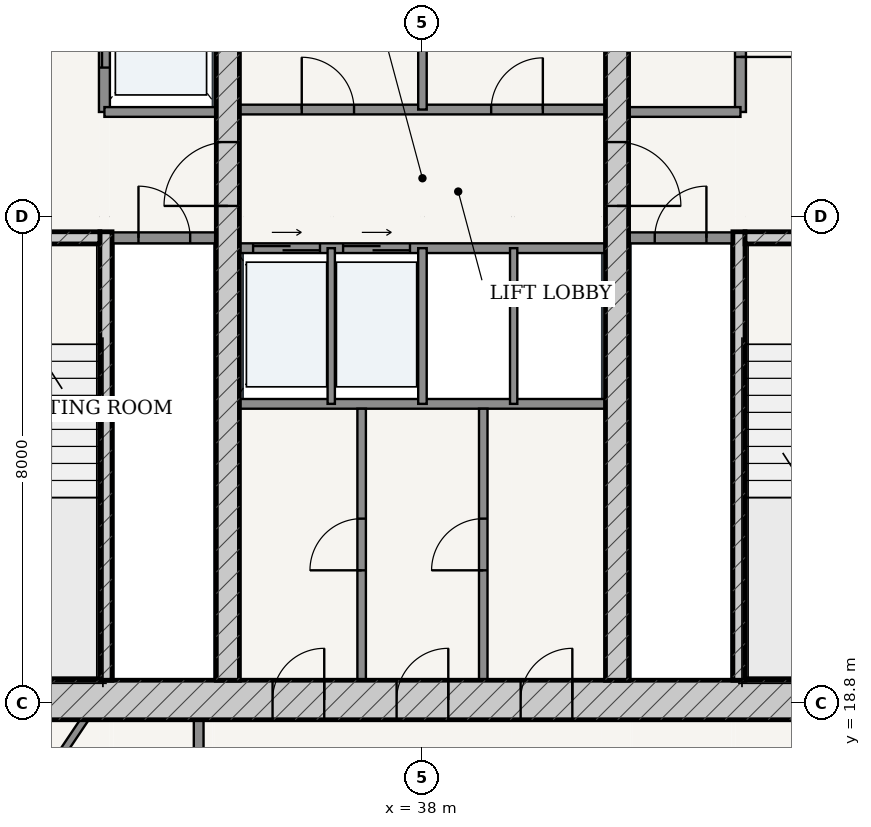
"""IFC4 building model, lengths in metres.
Left out: names, types, materials, properties, quantities, classifications, styles, units other than length and angle.
Written with IfcOpenShell. Run it as: python <this file> out.ifc"""

import sys

from ifc_helpers import new_model, si_unit, direction, frame, frame_2d, origin, place, context, subcontext, project, spatial, rectangle, extrude, source, transform, mapped, element, fill, save


model = new_model("IFC4")
c1 = context("Model", 3, precision=1e-05, world=origin(), true_north=direction((-0.2419218956, 0.970295726276)))
c2 = subcontext(c1, "Body", "Model", "MODEL_VIEW")
j1 = project(units=[si_unit("LENGTHUNIT", "METRE"), si_unit("PLANEANGLEUNIT", "RADIAN")], contexts=[c1])
p1 = place(None, origin())
s1 = spatial("IfcSite", under=j1, at=p1, CompositionType="ELEMENT")
p2 = place(p1, origin())
s2 = spatial("IfcBuilding", under=s1, at=p2, CompositionType="ELEMENT")
p3 = place(p2, frame((0.0, 0.0, 175.0)))
s3 = spatial("IfcBuildingStorey", under=s2, at=p3, CompositionType="ELEMENT", Elevation=175.0)
p4 = place(p3, frame((28.725, 18.85, 0.0), z_axis=(0.0, 0.0, 1.0), x_axis=(1.0, 0.0, 0.0)))
e1 = element("IfcWall", 1, at=p4, inside=s3, PredefinedType="SHEAR", context=c2, shape_type="SweptSolid", body=[
    extrude(rectangle(XDim=18.55, YDim=0.65, at=frame_2d((9.275, 0.0))), origin(), (0.0, 0.0, 1.0), 3.33),
])
p5 = place(p4, frame((6.81, 0.0, 0.0)))
e2 = element("IfcOpeningElement", 2, at=p5, cuts=e1, PredefinedType="OPENING", context=c2, shape_type="SweptSolid", body=[
    extrude(rectangle(XDim=0.85, YDim=2.1, at=frame_2d((0.425, 1.05))), frame((0.0, 0.335, 0.0), z_axis=(0.0, -1.0, 0.0), x_axis=(1.0, 0.0, 0.0)), (0.0, 0.0, 1.0), 0.67),
])
p6 = place(p4, frame((8.85, 0.0, 0.0)))
e3 = element("IfcOpeningElement", 3, at=p6, cuts=e1, PredefinedType="OPENING", context=c2, shape_type="SweptSolid", body=[
    extrude(rectangle(XDim=0.85, YDim=2.1, at=frame_2d((0.425, 1.05))), frame((0.0, 0.335, 0.0), z_axis=(0.0, -1.0, 0.0), x_axis=(1.0, 0.0, 0.0)), (0.0, 0.0, 1.0), 0.67),
])
p7 = place(p4, frame((10.89, 0.0, 0.0)))
e4 = element("IfcOpeningElement", 4, at=p7, cuts=e1, PredefinedType="OPENING", context=c2, shape_type="SweptSolid", body=[
    extrude(rectangle(XDim=0.85, YDim=2.1, at=frame_2d((0.425, 1.05))), frame((0.0, 0.335, 0.0), z_axis=(0.0, -1.0, 0.0), x_axis=(1.0, 0.0, 0.0)), (0.0, 0.0, 1.0), 0.67),
])
p8 = place(p3, frame((32.795, 19.175, 0.0), z_axis=(0.0, 0.0, 1.0), x_axis=(0.0, 1.0, 0.0)))
e5 = element("IfcWall", 5, at=p8, inside=s3, PredefinedType="SOLIDWALL", context=c2, shape_type="SweptSolid", body=[
    extrude(rectangle(XDim=7.375, YDim=0.2, at=frame_2d((3.688, 0.0))), origin(), (0.0, 0.0, 1.0), 3.33),
])
p9 = place(p3, frame((29.375, 26.45, 0.0), z_axis=(0.0, 0.0, 1.0), x_axis=(1.0, 0.0, 0.0)))
e6 = element("IfcWall", 6, at=p9, inside=s3, PredefinedType="SOLIDWALL", context=c2, shape_type="SweptSolid", body=[
    extrude(rectangle(XDim=3.32, YDim=0.2, at=frame_2d((1.66, 0.0))), origin(), (0.0, 0.0, 1.0), 3.33),
])
p10 = place(p9, frame((1.185, 0.0, 0.0)))
e7 = element("IfcOpeningElement", 7, at=p10, cuts=e6, PredefinedType="OPENING", context=c2, shape_type="SweptSolid", body=[
    extrude(rectangle(XDim=0.95, YDim=2.15, at=frame_2d((0.475, 1.075))), frame((0.0, 0.11, 0.0), z_axis=(0.0, -1.0, 0.0), x_axis=(1.0, 0.0, 0.0)), (0.0, 0.0, 1.0), 0.22),
])
p11 = place(p3, frame((43.205, 19.175, 0.0), z_axis=(0.0, 0.0, 1.0), x_axis=(0.0, 1.0, 0.0)))
e8 = element("IfcWall", 8, at=p11, inside=s3, PredefinedType="SOLIDWALL", context=c2, shape_type="SweptSolid", body=[
    extrude(rectangle(XDim=7.375, YDim=0.2, at=frame_2d((3.688, 0.0))), origin(), (0.0, 0.0, 1.0), 3.33),
])
p12 = place(p3, frame((43.305, 26.45, 0.0), z_axis=(0.0, 0.0, 1.0), x_axis=(1.0, 0.0, 0.0)))
e9 = element("IfcWall", 9, at=p12, inside=s3, PredefinedType="SOLIDWALL", context=c2, shape_type="SweptSolid", body=[
    extrude(rectangle(XDim=3.32, YDim=0.2, at=frame_2d((1.66, 0.0))), origin(), (0.0, 0.0, 1.0), 3.33),
])
p13 = place(p12, frame((1.185, 0.0, 0.0)))
e10 = element("IfcOpeningElement", 10, at=p13, cuts=e9, PredefinedType="OPENING", context=c2, shape_type="SweptSolid", body=[
    extrude(rectangle(XDim=0.95, YDim=2.15, at=frame_2d((0.475, 1.075))), frame((0.0, 0.11, 0.0), z_axis=(0.0, -1.0, 0.0), x_axis=(1.0, 0.0, 0.0)), (0.0, 0.0, 1.0), 0.22),
])
p14 = place(p3, frame((34.8, 19.175, 0.0), z_axis=(0.0, 0.0, 1.0), x_axis=(0.0, 1.0, 0.0)))
e11 = element("IfcWall", 11, at=p14, inside=s3, PredefinedType="SHEAR", context=c2, shape_type="SweptSolid", body=[
    extrude(rectangle(XDim=15.25, YDim=0.38, at=frame_2d((7.625, 0.0))), origin(), (0.0, 0.0, 1.0), 3.33),
])
p15 = place(p14, frame((7.8, 0.0, 0.0)))
e12 = element("IfcOpeningElement", 12, at=p15, cuts=e11, PredefinedType="OPENING", context=c2, shape_type="SweptSolid", body=[
    extrude(rectangle(XDim=1.05, YDim=2.15, at=frame_2d((0.525, 1.075))), frame((0.0, 0.2, 0.0), z_axis=(0.0, -1.0, 0.0), x_axis=(1.0, 0.0, 0.0)), (0.0, 0.0, 1.0), 0.4),
])
p16 = place(p3, frame((41.2, 19.175, 0.0), z_axis=(0.0, 0.0, 1.0), x_axis=(0.0, 1.0, 0.0)))
e13 = element("IfcWall", 13, at=p16, inside=s3, PredefinedType="SHEAR", context=c2, shape_type="SweptSolid", body=[
    extrude(rectangle(XDim=15.25, YDim=0.38, at=frame_2d((7.625, 0.0))), origin(), (0.0, 0.0, 1.0), 3.33),
])
p17 = place(p16, frame((7.8, 0.0, 0.0)))
e14 = element("IfcOpeningElement", 14, at=p17, cuts=e13, PredefinedType="OPENING", context=c2, shape_type="SweptSolid", body=[
    extrude(rectangle(XDim=1.05, YDim=2.15, at=frame_2d((0.525, 1.075))), frame((0.0, 0.2, 0.0), z_axis=(0.0, -1.0, 0.0), x_axis=(1.0, 0.0, 0.0)), (0.0, 0.0, 1.0), 0.4),
])
p18 = place(p3, frame((32.9, 26.45, 0.0), z_axis=(0.0, 0.0, 1.0), x_axis=(1.0, 0.0, 0.0)))
e15 = element("IfcWall", 15, at=p18, inside=s3, PredefinedType="PARTITIONING", context=c2, shape_type="SweptSolid", body=[
    extrude(rectangle(XDim=1.71, YDim=0.18, at=frame_2d((0.855, 0.0))), origin(), (0.0, 0.0, 1.0), 3.33),
])
p19 = place(p18, frame((0.43, 0.0, 0.0)))
e16 = element("IfcOpeningElement", 16, at=p19, cuts=e15, PredefinedType="OPENING", context=c2, shape_type="SweptSolid", body=[
    extrude(rectangle(XDim=0.85, YDim=2.1, at=frame_2d((0.425, 1.05))), frame((0.0, 0.1, 0.0), z_axis=(0.0, -1.0, 0.0), x_axis=(1.0, 0.0, 0.0)), (0.0, 0.0, 1.0), 0.2),
])
p20 = place(p3, frame((41.39, 26.45, 0.0), z_axis=(0.0, 0.0, 1.0), x_axis=(1.0, 0.0, 0.0)))
e17 = element("IfcWall", 17, at=p20, inside=s3, PredefinedType="PARTITIONING", context=c2, shape_type="SweptSolid", body=[
    extrude(rectangle(XDim=1.71, YDim=0.18, at=frame_2d((0.855, 0.0))), origin(), (0.0, 0.0, 1.0), 3.33),
])
p21 = place(p20, frame((0.43, 0.0, 0.0)))
e18 = element("IfcOpeningElement", 18, at=p21, cuts=e17, PredefinedType="OPENING", context=c2, shape_type="SweptSolid", body=[
    extrude(rectangle(XDim=0.85, YDim=2.1, at=frame_2d((0.425, 1.05))), frame((0.0, 0.1, 0.0), z_axis=(0.0, -1.0, 0.0), x_axis=(1.0, 0.0, 0.0)), (0.0, 0.0, 1.0), 0.2),
])
p22 = place(p3, frame((32.77, 28.52, 0.0), z_axis=(0.0, 0.0, 1.0), x_axis=(0.0, 1.0, 0.0)))
e19 = element("IfcWall", 19, at=p22, inside=s3, PredefinedType="PARTITIONING", context=c2, shape_type="SweptSolid", body=[
    extrude(rectangle(XDim=5.905, YDim=0.18, at=frame_2d((2.953, 0.0))), origin(), (0.0, 0.0, 1.0), 3.33),
])
p23 = place(p22, frame((3.655, 0.0, 0.0)))
e20 = element("IfcOpeningElement", 20, at=p23, cuts=e19, PredefinedType="OPENING", context=c2, shape_type="SweptSolid", body=[
    extrude(rectangle(XDim=1.15, YDim=2.2, at=frame_2d((0.575, 1.1))), frame((0.0, 0.1, 0.0), z_axis=(0.0, -1.0, 0.0), x_axis=(1.0, 0.0, 0.0)), (0.0, 0.0, 1.0), 0.2),
])
p24 = place(p22, frame((0.73, 0.0, 0.0)))
e21 = element("IfcOpeningElement", 21, at=p24, cuts=e19, PredefinedType="OPENING", context=c2, shape_type="SweptSolid", body=[
    extrude(rectangle(XDim=1.2, YDim=2.25, at=frame_2d((0.6, 1.125))), frame((0.0, 0.1, 0.0), z_axis=(0.0, -1.0, 0.0), x_axis=(1.0, 0.0, 0.0)), (0.0, 0.0, 1.0), 0.2),
])
p25 = place(p3, frame((32.77, 28.52, 0.0), z_axis=(0.0, 0.0, 1.0), x_axis=(1.0, 0.0, 0.0)))
e22 = element("IfcWall", 22, at=p25, inside=s3, PredefinedType="PARTITIONING", context=c2, shape_type="SweptSolid", body=[
    extrude(rectangle(XDim=1.84, YDim=0.16, at=frame_2d((0.92, 0.0))), origin(), (0.0, 0.0, 1.0), 3.33),
])
p26 = place(p3, frame((43.23, 28.52, 0.0), z_axis=(0.0, 0.0, 1.0), x_axis=(0.0, 1.0, 0.0)))
e23 = element("IfcWall", 23, at=p26, inside=s3, PredefinedType="PARTITIONING", context=c2, shape_type="SweptSolid", body=[
    extrude(rectangle(XDim=5.905, YDim=0.18, at=frame_2d((2.953, 0.0))), origin(), (0.0, 0.0, 1.0), 3.33),
])
p27 = place(p26, frame((0.905, 0.0, 0.0)))
e24 = element("IfcOpeningElement", 24, at=p27, cuts=e23, PredefinedType="OPENING", context=c2, shape_type="SweptSolid", body=[
    extrude(rectangle(XDim=0.85, YDim=2.1, at=frame_2d((0.425, 1.05))), frame((0.0, 0.1, 0.0), z_axis=(0.0, -1.0, 0.0), x_axis=(1.0, 0.0, 0.0)), (0.0, 0.0, 1.0), 0.2),
])
p28 = place(p26, frame((3.655, 0.0, 0.0)))
e25 = element("IfcOpeningElement", 25, at=p28, cuts=e23, PredefinedType="OPENING", context=c2, shape_type="SweptSolid", body=[
    extrude(rectangle(XDim=1.15, YDim=2.2, at=frame_2d((0.575, 1.1))), frame((0.0, 0.1, 0.0), z_axis=(0.0, -1.0, 0.0), x_axis=(1.0, 0.0, 0.0)), (0.0, 0.0, 1.0), 0.2),
])
p29 = place(p3, frame((41.39, 28.52, 0.0), z_axis=(0.0, 0.0, 1.0), x_axis=(1.0, 0.0, 0.0)))
e26 = element("IfcWall", 26, at=p29, inside=s3, PredefinedType="PARTITIONING", context=c2, shape_type="SweptSolid", body=[
    extrude(rectangle(XDim=1.84, YDim=0.16, at=frame_2d((0.92, 0.0))), origin(), (0.0, 0.0, 1.0), 3.33),
])
p30 = place(p3, frame((34.99, 28.56, 0.0), z_axis=(0.0, 0.0, 1.0), x_axis=(1.0, 0.0, 0.0)))
e27 = element("IfcWall", 27, at=p30, inside=s3, PredefinedType="PARTITIONING", context=c2, shape_type="SweptSolid", body=[
    extrude(rectangle(XDim=6.02, YDim=0.16, at=frame_2d((3.01, 0.0))), origin(), (0.0, 0.0, 1.0), 3.33),
])
p31 = place(p30, frame((1.025, 0.0, 0.0)))
e28 = element("IfcOpeningElement", 28, at=p31, cuts=e27, PredefinedType="OPENING", context=c2, shape_type="SweptSolid", body=[
    extrude(rectangle(XDim=0.86, YDim=2.1, at=frame_2d((0.43, 1.05))), frame((0.0, 0.09, 0.0), z_axis=(0.0, -1.0, 0.0), x_axis=(1.0, 0.0, 0.0)), (0.0, 0.0, 1.0), 0.18),
])
p32 = place(p30, frame((4.14, 0.0, 0.0)))
e29 = element("IfcOpeningElement", 29, at=p32, cuts=e27, PredefinedType="OPENING", context=c2, shape_type="SweptSolid", body=[
    extrude(rectangle(XDim=0.85, YDim=2.1, at=frame_2d((0.425, 1.05))), frame((0.0, 0.09, 0.0), z_axis=(0.0, -1.0, 0.0), x_axis=(1.0, 0.0, 0.0)), (0.0, 0.0, 1.0), 0.18),
])
p33 = place(p3, frame((38.0, 28.56, 0.0), z_axis=(0.0, 0.0, 1.0), x_axis=(0.0, 1.0, 0.0)))
e30 = element("IfcWall", 30, at=p33, inside=s3, PredefinedType="PARTITIONING", context=c2, shape_type="SweptSolid", body=[
    extrude(rectangle(XDim=5.865, YDim=0.14, at=frame_2d((2.933, 0.0))), origin(), (0.0, 0.0, 1.0), 3.33),
])
p34 = place(p3, frame((34.99, 26.28, 0.0), z_axis=(0.0, 0.0, 1.0), x_axis=(1.0, 0.0, 0.0)))
e31 = element("IfcWall", 31, at=p34, inside=s3, PredefinedType="PARTITIONING", context=c2, shape_type="SweptSolid", body=[
    extrude(rectangle(XDim=6.02, YDim=0.16, at=frame_2d((3.01, 0.0))), origin(), (0.0, 0.0, 1.0), 3.33),
])
p35 = place(p34, frame((0.225, 0.0, 0.0)))
e32 = element("IfcOpeningElement", 32, at=p35, cuts=e31, PredefinedType="OPENING", context=c2, shape_type="SweptSolid", body=[
    extrude(rectangle(XDim=1.1, YDim=2.2, at=frame_2d((0.55, 1.1))), frame((0.0, 0.09, 0.0), z_axis=(0.0, -1.0, 0.0), x_axis=(1.0, 0.0, 0.0)), (0.0, 0.0, 1.0), 0.18),
])
p36 = place(p34, frame((1.705, 0.0, 0.0)))
e33 = element("IfcOpeningElement", 33, at=p36, cuts=e31, PredefinedType="OPENING", context=c2, shape_type="SweptSolid", body=[
    extrude(rectangle(XDim=1.1, YDim=2.2, at=frame_2d((0.55, 1.1))), frame((0.0, 0.09, 0.0), z_axis=(0.0, -1.0, 0.0), x_axis=(1.0, 0.0, 0.0)), (0.0, 0.0, 1.0), 0.18),
])
p37 = place(p3, frame((34.99, 23.72, 0.0), z_axis=(0.0, 0.0, 1.0), x_axis=(1.0, 0.0, 0.0)))
e34 = element("IfcWall", 34, at=p37, inside=s3, PredefinedType="PARTITIONING", context=c2, shape_type="SweptSolid", body=[
    extrude(rectangle(XDim=6.02, YDim=0.16, at=frame_2d((3.01, 0.0))), origin(), (0.0, 0.0, 1.0), 3.33),
])
p38 = place(p3, frame((36.5, 23.72, 0.0), z_axis=(0.0, 0.0, 1.0), x_axis=(0.0, 1.0, 0.0)))
e35 = element("IfcWall", 35, at=p38, inside=s3, PredefinedType="PARTITIONING", context=c2, shape_type="SweptSolid", body=[
    extrude(rectangle(XDim=2.56, YDim=0.12, at=frame_2d((1.28, 0.0))), origin(), (0.0, 0.0, 1.0), 3.33),
])
p39 = place(p3, frame((38.0, 23.72, 0.0), z_axis=(0.0, 0.0, 1.0), x_axis=(0.0, 1.0, 0.0)))
e36 = element("IfcWall", 36, at=p39, inside=s3, PredefinedType="PARTITIONING", context=c2, shape_type="SweptSolid", body=[
    extrude(rectangle(XDim=2.56, YDim=0.14, at=frame_2d((1.28, 0.0))), origin(), (0.0, 0.0, 1.0), 3.33),
])
p40 = place(p3, frame((39.5, 23.72, 0.0), z_axis=(0.0, 0.0, 1.0), x_axis=(0.0, 1.0, 0.0)))
e37 = element("IfcWall", 37, at=p40, inside=s3, PredefinedType="PARTITIONING", context=c2, shape_type="SweptSolid", body=[
    extrude(rectangle(XDim=2.56, YDim=0.12, at=frame_2d((1.28, 0.0))), origin(), (0.0, 0.0, 1.0), 3.33),
])
p41 = place(p3, frame((37.0, 19.175, 0.0), z_axis=(0.0, 0.0, 1.0), x_axis=(0.0, 1.0, 0.0)))
e38 = element("IfcWall", 38, at=p41, inside=s3, PredefinedType="PARTITIONING", context=c2, shape_type="SweptSolid", body=[
    extrude(rectangle(XDim=4.465, YDim=0.14, at=frame_2d((2.232, 0.0))), origin(), (0.0, 0.0, 1.0), 3.33),
])
p42 = place(p41, frame((1.808, 0.0, 0.0)))
e39 = element("IfcOpeningElement", 39, at=p42, cuts=e38, PredefinedType="OPENING", context=c2, shape_type="SweptSolid", body=[
    extrude(rectangle(XDim=0.85, YDim=2.1, at=frame_2d((0.425, 1.05))), frame((0.0, 0.08, 0.0), z_axis=(0.0, -1.0, 0.0), x_axis=(1.0, 0.0, 0.0)), (0.0, 0.0, 1.0), 0.16),
])
p43 = place(p3, frame((39.0, 19.175, 0.0), z_axis=(0.0, 0.0, 1.0), x_axis=(0.0, 1.0, 0.0)))
e40 = element("IfcWall", 40, at=p43, inside=s3, PredefinedType="PARTITIONING", context=c2, shape_type="SweptSolid", body=[
    extrude(rectangle(XDim=4.465, YDim=0.14, at=frame_2d((2.232, 0.0))), origin(), (0.0, 0.0, 1.0), 3.33),
])
p44 = place(p43, frame((1.808, 0.0, 0.0)))
e41 = element("IfcOpeningElement", 41, at=p44, cuts=e40, PredefinedType="OPENING", context=c2, shape_type="SweptSolid", body=[
    extrude(rectangle(XDim=0.85, YDim=2.1, at=frame_2d((0.425, 1.05))), frame((0.0, 0.08, 0.0), z_axis=(0.0, -1.0, 0.0), x_axis=(1.0, 0.0, 0.0)), (0.0, 0.0, 1.0), 0.16),
])
p45 = place(p3, frame((34.32, 16.675, 0.0), z_axis=(0.0, 0.0, 1.0), x_axis=(0.0, 1.0, 0.0)))
e42 = element("IfcWall", 42, at=p45, inside=s3, PredefinedType="PARTITIONING", context=c2, shape_type="SweptSolid", body=[
    extrude(rectangle(XDim=1.85, YDim=0.16, at=frame_2d((0.925, 0.0))), origin(), (0.0, 0.0, 1.0), 3.33),
])
p46 = place(p3, frame((32.441, 18.525, 0.0), z_axis=(0.0, 0.0, 1.0), x_axis=(-0.557594690071, -0.830113342625, 0.0)))
e43 = element("IfcWall", 43, at=p46, inside=s3, PredefinedType="PARTITIONING", context=c2, shape_type="SweptSolid", body=[
    extrude(rectangle(XDim=3.13, YDim=0.12, at=frame_2d((1.565, 0.0))), origin(), (0.0, 0.0, 1.0), 3.33),
])
p47 = place(p46, frame((1.135, 0.0, 0.0)))
e44 = element("IfcOpeningElement", 44, at=p47, cuts=e43, PredefinedType="OPENING", context=c2, shape_type="SweptSolid", body=[
    extrude(rectangle(XDim=0.86, YDim=2.15, at=frame_2d((0.43, 1.075))), frame((0.0, 0.07, 0.0), z_axis=(0.0, -1.0, 0.0), x_axis=(1.0, 0.0, 0.0)), (0.0, 0.0, 1.0), 0.14),
])
m1 = source(origin(), c2, "Body", "SweptSolid", [
    extrude(rectangle(XDim=1.05, YDim=2.15, at=frame_2d((0.525, 1.075))), frame((0.0, 0.025, 0.0), z_axis=(0.0, -1.0, 0.0), x_axis=(1.0, 0.0, 0.0)), (0.0, 0.0, 1.0), 0.05),
])
p48 = place(p15, origin())
e45 = element("IfcDoor", 45, at=p48, inside=s3, OperationType="SINGLE_SWING_LEFT", PredefinedType="DOOR", context=c2, shape_type="MappedRepresentation", body=[
    mapped(m1, transform((0.0, 0.0, 0.0), scale=1.0)),
])
fill(e12, e45)
p49 = place(p17, frame((1.05, 0.0, 0.0), z_axis=(0.0, 0.0, 1.0), x_axis=(-1.0, 0.0, 0.0)))
e46 = element("IfcDoor", 46, at=p49, inside=s3, OperationType="SINGLE_SWING_RIGHT", PredefinedType="DOOR", context=c2, shape_type="MappedRepresentation", body=[
    mapped(m1, transform((0.0, 0.0, 0.0), scale=1.0)),
])
fill(e14, e46)
m2 = source(origin(), c2, "Body", "SweptSolid", [
    extrude(rectangle(XDim=0.85, YDim=2.1, at=frame_2d((0.425, 1.05))), frame((0.0, 0.025, 0.0), z_axis=(0.0, -1.0, 0.0), x_axis=(1.0, 0.0, 0.0)), (0.0, 0.0, 1.0), 0.05),
])
p50 = place(p19, origin())
e47 = element("IfcDoor", 47, at=p50, inside=s3, OperationType="SINGLE_SWING_LEFT", PredefinedType="DOOR", context=c2, shape_type="MappedRepresentation", body=[
    mapped(m2, transform((0.0, 0.0, 0.0), scale=1.0)),
])
fill(e16, e47)
p51 = place(p21, origin())
e48 = element("IfcDoor", 48, at=p51, inside=s3, OperationType="SINGLE_SWING_RIGHT", PredefinedType="DOOR", context=c2, shape_type="MappedRepresentation", body=[
    mapped(m2, transform((0.0, 0.0, 0.0), scale=1.0)),
])
fill(e18, e48)
p52 = place(p27, frame((0.85, 0.0, 0.0), z_axis=(0.0, 0.0, 1.0), x_axis=(-1.0, 0.0, 0.0)))
e49 = element("IfcDoor", 49, at=p52, inside=s3, OperationType="SINGLE_SWING_RIGHT", PredefinedType="DOOR", context=c2, shape_type="MappedRepresentation", body=[
    mapped(m2, transform((0.0, 0.0, 0.0), scale=1.0)),
])
fill(e24, e49)
m3 = source(origin(), c2, "Body", "SweptSolid", [
    extrude(rectangle(XDim=0.86, YDim=2.1, at=frame_2d((0.43, 1.05))), frame((0.0, 0.025, 0.0), z_axis=(0.0, -1.0, 0.0), x_axis=(1.0, 0.0, 0.0)), (0.0, 0.0, 1.0), 0.05),
])
p53 = place(p31, origin())
e50 = element("IfcDoor", 50, at=p53, inside=s3, OperationType="SINGLE_SWING_LEFT", PredefinedType="DOOR", context=c2, shape_type="MappedRepresentation", body=[
    mapped(m3, transform((0.0, 0.0, 0.0), scale=1.0)),
])
fill(e28, e50)
p54 = place(p32, origin())
e51 = element("IfcDoor", 51, at=p54, inside=s3, OperationType="SINGLE_SWING_RIGHT", PredefinedType="DOOR", context=c2, shape_type="MappedRepresentation", body=[
    mapped(m2, transform((0.0, 0.0, 0.0), scale=1.0)),
])
fill(e29, e51)
p55 = place(p5, origin())
e52 = element("IfcDoor", 52, at=p55, inside=s3, OperationType="SINGLE_SWING_RIGHT", PredefinedType="DOOR", context=c2, shape_type="MappedRepresentation", body=[
    mapped(m2, transform((0.0, 0.0, 0.0), scale=1.0)),
])
fill(e2, e52)
p56 = place(p6, origin())
e53 = element("IfcDoor", 53, at=p56, inside=s3, OperationType="SINGLE_SWING_RIGHT", PredefinedType="DOOR", context=c2, shape_type="MappedRepresentation", body=[
    mapped(m2, transform((0.0, 0.0, 0.0), scale=1.0)),
])
fill(e3, e53)
p57 = place(p7, origin())
e54 = element("IfcDoor", 54, at=p57, inside=s3, OperationType="SINGLE_SWING_RIGHT", PredefinedType="DOOR", context=c2, shape_type="MappedRepresentation", body=[
    mapped(m2, transform((0.0, 0.0, 0.0), scale=1.0)),
])
fill(e4, e54)
p58 = place(p42, origin())
e55 = element("IfcDoor", 55, at=p58, inside=s3, OperationType="SINGLE_SWING_LEFT", PredefinedType="DOOR", context=c2, shape_type="MappedRepresentation", body=[
    mapped(m2, transform((0.0, 0.0, 0.0), scale=1.0)),
])
fill(e39, e55)
p59 = place(p44, origin())
e56 = element("IfcDoor", 56, at=p59, inside=s3, OperationType="SINGLE_SWING_LEFT", PredefinedType="DOOR", context=c2, shape_type="MappedRepresentation", body=[
    mapped(m2, transform((0.0, 0.0, 0.0), scale=1.0)),
])
fill(e41, e56)
m4 = source(origin(), c2, "Body", "SweptSolid", [
    extrude(rectangle(XDim=1.2, YDim=2.25, at=frame_2d((0.6, 1.125))), frame((0.0, 0.025, 0.0), z_axis=(0.0, -1.0, 0.0), x_axis=(1.0, 0.0, 0.0)), (0.0, 0.0, 1.0), 0.05),
])
p60 = place(p24, origin())
e57 = element("IfcDoor", 57, at=p60, inside=s3, OperationType="DOUBLE_DOOR_SLIDING", PredefinedType="DOOR", context=c2, shape_type="MappedRepresentation", body=[
    mapped(m4, transform((0.0, 0.0, 0.0), scale=1.0)),
])
fill(e21, e57)
m5 = source(origin(), c2, "Body", "SweptSolid", [
    extrude(rectangle(XDim=1.1, YDim=2.2, at=frame_2d((0.55, 1.1))), frame((0.0, 0.025, 0.0), z_axis=(0.0, -1.0, 0.0), x_axis=(1.0, 0.0, 0.0)), (0.0, 0.0, 1.0), 0.05),
])
p61 = place(p35, origin())
e58 = element("IfcDoor", 58, at=p61, inside=s3, OperationType="DOUBLE_DOOR_SLIDING", PredefinedType="DOOR", context=c2, shape_type="MappedRepresentation", body=[
    mapped(m5, transform((0.0, 0.0, 0.0), scale=1.0)),
])
fill(e32, e58)
p62 = place(p36, origin())
e59 = element("IfcDoor", 59, at=p62, inside=s3, OperationType="DOUBLE_DOOR_SLIDING", PredefinedType="DOOR", context=c2, shape_type="MappedRepresentation", body=[
    mapped(m5, transform((0.0, 0.0, 0.0), scale=1.0)),
])
fill(e33, e59)
save(model, sys.argv[1])
